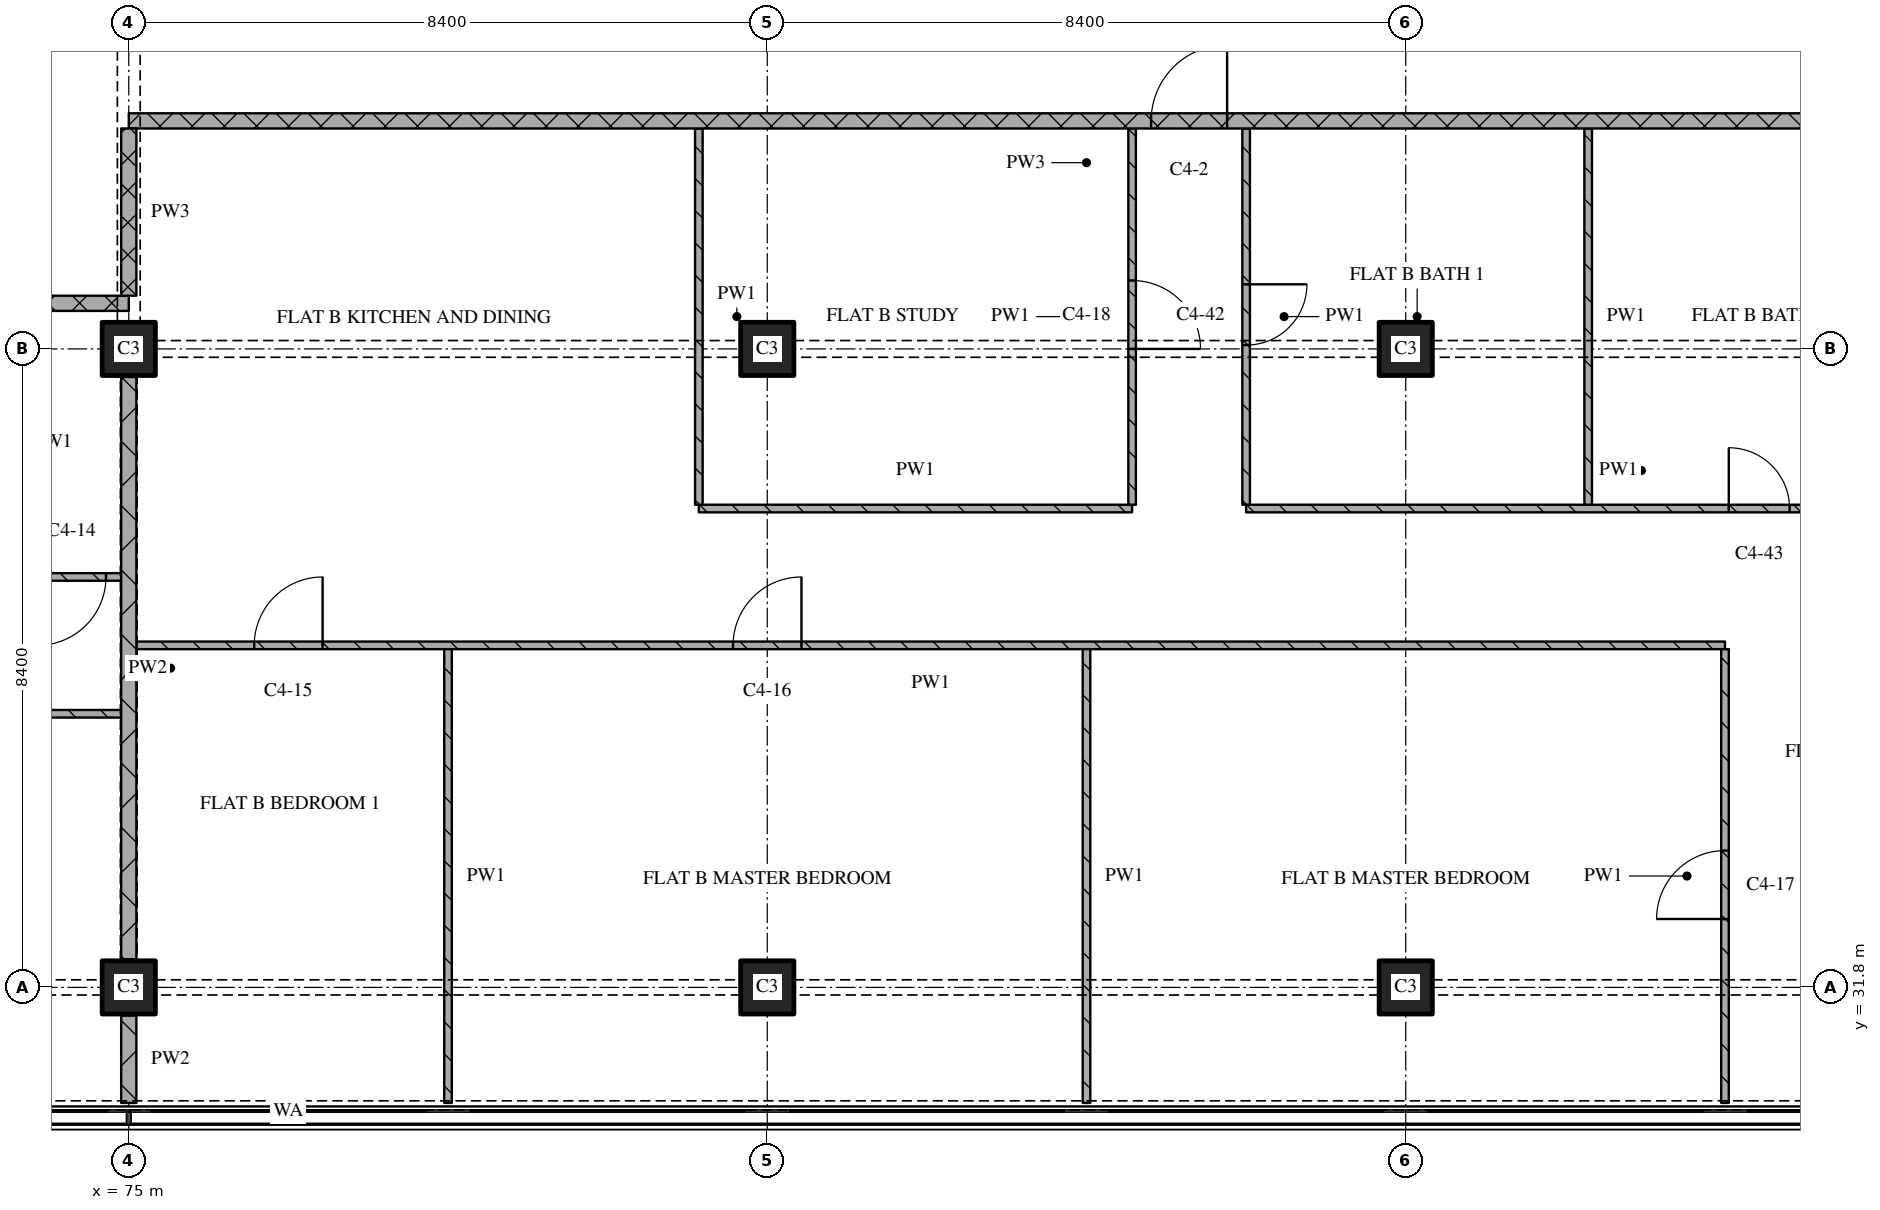
"""IFC4 building model, lengths in metres.
Left out: names, types, materials, properties, quantities, classifications, styles, units other than length and angle.
Written with IfcOpenShell. Run it as: python <this file> out.ifc"""

import sys

from ifc_helpers import new_model, si_unit, direction, frame, frame_2d, origin, origin_2d, place, context, subcontext, project, spatial, rectangle, extrude, element, fill, save


model = new_model("IFC4")
c1 = context("Model", 3, precision=1e-05, world=origin(), true_north=direction((0.0, 1.0)))
c2 = subcontext(c1, "Body", "Model", "MODEL_VIEW")
j1 = project(units=[si_unit("LENGTHUNIT", "METRE"), si_unit("PLANEANGLEUNIT", "RADIAN")], contexts=[c1])
p1 = place(None, origin())
s1 = spatial("IfcSite", under=j1, at=p1, CompositionType="ELEMENT")
p2 = place(p1, origin())
s2 = spatial("IfcBuilding", under=s1, at=p2, CompositionType="ELEMENT")
p3 = place(p2, frame((0.0, 0.0, 183.45)))
s3 = spatial("IfcBuildingStorey", under=s2, at=p3, CompositionType="ELEMENT", Elevation=183.45)
for number, where, z_axis, x_axis in (
    (1, (75.0, 31.8, 0.0), (0.0, 0.0, 1.0), (1.0, 0.0, 0.0)),
    (2, (75.0, 40.2, 0.0), (0.0, 0.0, 1.0), (1.0, 0.0, 0.0)),
    (3, (83.4, 31.8, 0.0), (0.0, 0.0, 1.0), (1.0, 0.0, 0.0)),
    (4, (83.4, 40.2, 0.0), (0.0, 0.0, 1.0), (1.0, 0.0, 0.0)),
    (5, (91.8, 31.8, 0.0), (0.0, 0.0, 1.0), (1.0, 0.0, 0.0)),
    (6, (91.8, 40.2, 0.0), (0.0, 0.0, 1.0), (1.0, 0.0, 0.0)),
):
    element("IfcColumn", number, at=place(p3, frame(where, z_axis=z_axis, x_axis=x_axis)), inside=s3, PredefinedType="COLUMN", context=c2, shape_type="SweptSolid", body=[
        extrude(rectangle(XDim=0.7, YDim=0.7, at=origin_2d()), origin(), (0.0, 0.0, 1.0), 3.6),
    ])
p4 = place(p3, frame((74.9, 35.4, 0.0), z_axis=(0.0, 0.0, 1.0), x_axis=(-1.0, 0.0, 0.0)))
e7 = element("IfcWall", 7, at=p4, inside=s3, PredefinedType="PARTITIONING", context=c2, shape_type="SweptSolid", body=[
    extrude(rectangle(XDim=8.3, YDim=0.1, at=frame_2d((4.15, 0.0))), origin(), (0.0, 0.0, 1.0), 3.32),
])
p5 = place(p4, frame((3.65, 0.0, 0.0)))
e8 = element("IfcOpeningElement", 8, at=p5, cuts=e7, PredefinedType="OPENING", context=c2, shape_type="SweptSolid", body=[
    extrude(rectangle(XDim=0.9, YDim=2.1, at=frame_2d((0.45, 1.05))), frame((0.0, 0.06, 0.0), z_axis=(0.0, -1.0, 0.0), x_axis=(1.0, 0.0, 0.0)), (0.0, 0.0, 1.0), 0.12),
])
p6 = place(p3, frame((96.0, 36.3, 0.0), z_axis=(0.0, 0.0, 1.0), x_axis=(-1.0, 0.0, 0.0)))
e9 = element("IfcWall", 9, at=p6, inside=s3, PredefinedType="PARTITIONING", context=c2, shape_type="SweptSolid", body=[
    extrude(rectangle(XDim=20.9, YDim=0.1, at=frame_2d((10.45, 0.0))), origin(), (0.0, 0.0, 1.0), 3.32),
])
p7 = place(p6, frame((12.15, 0.0, 0.0)))
e10 = element("IfcOpeningElement", 10, at=p7, cuts=e9, PredefinedType="OPENING", context=c2, shape_type="SweptSolid", body=[
    extrude(rectangle(XDim=0.9, YDim=2.1, at=frame_2d((0.45, 1.05))), frame((0.0, 0.06, 0.0), z_axis=(0.0, -1.0, 0.0), x_axis=(1.0, 0.0, 0.0)), (0.0, 0.0, 1.0), 0.12),
])
p8 = place(p6, frame((18.45, 0.0, 0.0)))
e11 = element("IfcOpeningElement", 11, at=p8, cuts=e9, PredefinedType="OPENING", context=c2, shape_type="SweptSolid", body=[
    extrude(rectangle(XDim=0.9, YDim=2.1, at=frame_2d((0.45, 1.05))), frame((0.0, 0.06, 0.0), z_axis=(0.0, -1.0, 0.0), x_axis=(1.0, 0.0, 0.0)), (0.0, 0.0, 1.0), 0.12),
])
p9 = place(p3, frame((64.5, 37.2, 0.0), z_axis=(0.0, 0.0, 1.0), x_axis=(1.0, 0.0, 0.0)))
e12 = element("IfcWall", 12, at=p9, inside=s3, PredefinedType="PARTITIONING", context=c2, shape_type="SweptSolid", body=[
    extrude(rectangle(XDim=10.4, YDim=0.1, at=frame_2d((5.2, 0.0))), origin(), (0.0, 0.0, 1.0), 3.32),
])
p10 = place(p9, frame((6.35, 0.0, 0.0)))
e13 = element("IfcOpeningElement", 13, at=p10, cuts=e12, PredefinedType="OPENING", context=c2, shape_type="SweptSolid", body=[
    extrude(rectangle(XDim=0.8, YDim=2.1, at=frame_2d((0.4, 1.05))), frame((0.0, 0.06, 0.0), z_axis=(0.0, -1.0, 0.0), x_axis=(1.0, 0.0, 0.0)), (0.0, 0.0, 1.0), 0.12),
])
p11 = place(p9, frame((9.3, 0.0, 0.0)))
e14 = element("IfcOpeningElement", 14, at=p11, cuts=e12, PredefinedType="OPENING", context=c2, shape_type="SweptSolid", body=[
    extrude(rectangle(XDim=0.9, YDim=2.1, at=frame_2d((0.45, 1.05))), frame((0.0, 0.06, 0.0), z_axis=(0.0, -1.0, 0.0), x_axis=(1.0, 0.0, 0.0)), (0.0, 0.0, 1.0), 0.12),
])
p12 = place(p3, frame((82.5, 38.1, 0.0), z_axis=(0.0, 0.0, 1.0), x_axis=(1.0, 0.0, 0.0)))
e15 = element("IfcWall", 15, at=p12, inside=s3, PredefinedType="PARTITIONING", context=c2, shape_type="SweptSolid", body=[
    extrude(rectangle(XDim=5.7, YDim=0.1, at=frame_2d((2.85, 0.0))), origin(), (0.0, 0.0, 1.0), 3.32),
])
p13 = place(p3, frame((89.7, 38.1, 0.0), z_axis=(0.0, 0.0, 1.0), x_axis=(1.0, 0.0, 0.0)))
e16 = element("IfcWall", 16, at=p13, inside=s3, PredefinedType="PARTITIONING", context=c2, shape_type="SweptSolid", body=[
    extrude(rectangle(XDim=10.4, YDim=0.1, at=frame_2d((5.2, 0.0))), origin(), (0.0, 0.0, 1.0), 3.32),
])
p14 = place(p13, frame((6.35, 0.0, 0.0)))
e17 = element("IfcOpeningElement", 17, at=p14, cuts=e16, PredefinedType="OPENING", context=c2, shape_type="SweptSolid", body=[
    extrude(rectangle(XDim=0.8, YDim=2.1, at=frame_2d((0.4, 1.05))), frame((0.0, 0.06, 0.0), z_axis=(0.0, -1.0, 0.0), x_axis=(1.0, 0.0, 0.0)), (0.0, 0.0, 1.0), 0.12),
])
p15 = place(p13, frame((9.3, 0.0, 0.0)))
e18 = element("IfcOpeningElement", 18, at=p15, cuts=e16, PredefinedType="OPENING", context=c2, shape_type="SweptSolid", body=[
    extrude(rectangle(XDim=0.9, YDim=2.1, at=frame_2d((0.45, 1.05))), frame((0.0, 0.06, 0.0), z_axis=(0.0, -1.0, 0.0), x_axis=(1.0, 0.0, 0.0)), (0.0, 0.0, 1.0), 0.12),
])
p16 = place(p3, frame((75.0, 40.8, 0.0), z_axis=(0.0, 0.0, 1.0), x_axis=(-1.0, 0.0, 0.0)))
e19 = element("IfcWall", 19, at=p16, inside=s3, PredefinedType="PARTITIONING", context=c2, shape_type="SweptSolid", body=[
    extrude(rectangle(XDim=24.28, YDim=0.2, at=frame_2d((12.14, 0.0))), origin(), (0.0, 0.0, 1.0), 3.32),
])
p17 = place(p16, frame((10.75, 0.0, 0.0)))
e20 = element("IfcOpeningElement", 20, at=p17, cuts=e19, PredefinedType="OPENING", context=c2, shape_type="SweptSolid", body=[
    extrude(rectangle(XDim=1.0, YDim=2.1, at=frame_2d((0.5, 1.05))), frame((0.0, 0.11, 0.0), z_axis=(0.0, -1.0, 0.0), x_axis=(1.0, 0.0, 0.0)), (0.0, 0.0, 1.0), 0.22),
])
p18 = place(p3, frame((100.2, 43.2, 0.0), z_axis=(0.0, 0.0, 1.0), x_axis=(-1.0, 0.0, 0.0)))
e21 = element("IfcWall", 21, at=p18, inside=s3, PredefinedType="PARTITIONING", context=c2, shape_type="SweptSolid", body=[
    extrude(rectangle(XDim=25.2, YDim=0.2, at=frame_2d((12.6, 0.0))), origin(), (0.0, 0.0, 1.0), 3.32),
])
p19 = place(p18, frame((10.75, 0.0, 0.0)))
e22 = element("IfcOpeningElement", 22, at=p19, cuts=e21, PredefinedType="OPENING", context=c2, shape_type="SweptSolid", body=[
    extrude(rectangle(XDim=1.0, YDim=2.1, at=frame_2d((0.5, 1.05))), frame((0.0, 0.11, 0.0), z_axis=(0.0, -1.0, 0.0), x_axis=(1.0, 0.0, 0.0)), (0.0, 0.0, 1.0), 0.22),
])
p20 = place(p3, frame((75.0, 43.1, 0.0), z_axis=(0.0, 0.0, 1.0), x_axis=(0.0, -1.0, 0.0)))
e23 = element("IfcWall", 23, at=p20, inside=s3, PredefinedType="PARTITIONING", context=c2, shape_type="SweptSolid", body=[
    extrude(rectangle(XDim=2.2, YDim=0.2, at=frame_2d((1.1, 0.0))), origin(), (0.0, 0.0, 1.0), 2.43),
])
p21 = place(p3, frame((75.0, 31.43, 0.0), z_axis=(0.0, 0.0, 1.0), x_axis=(0.0, -1.0, 0.0)))
e24 = element("IfcWall", 24, at=p21, inside=s3, PredefinedType="PARTITIONING", context=c2, shape_type="SweptSolid", body=[
    extrude(rectangle(XDim=1.15, YDim=0.2, at=frame_2d((0.575, 0.0))), origin(), (0.0, 0.0, 1.0), 3.32),
])
p22 = place(p3, frame((75.0, 39.83, 0.0), z_axis=(0.0, 0.0, 1.0), x_axis=(0.0, -1.0, 0.0)))
e25 = element("IfcWall", 25, at=p22, inside=s3, PredefinedType="PARTITIONING", context=c2, shape_type="SweptSolid", body=[
    extrude(rectangle(XDim=7.66, YDim=0.2, at=frame_2d((3.83, 0.0))), origin(), (0.0, 0.0, 1.0), 2.72),
])
p23 = place(p3, frame((79.2, 36.25, 0.0), z_axis=(0.0, 0.0, 1.0), x_axis=(0.0, -1.0, 0.0)))
e26 = element("IfcWall", 26, at=p23, inside=s3, PredefinedType="PARTITIONING", context=c2, shape_type="SweptSolid", body=[
    extrude(rectangle(XDim=5.97, YDim=0.1, at=frame_2d((2.985, 0.0))), origin(), (0.0, 0.0, 1.0), 3.32),
])
p24 = place(p3, frame((82.5, 43.1, 0.0), z_axis=(0.0, 0.0, 1.0), x_axis=(0.0, -1.0, 0.0)))
e27 = element("IfcWall", 27, at=p24, inside=s3, PredefinedType="PARTITIONING", context=c2, shape_type="SweptSolid", body=[
    extrude(rectangle(XDim=4.95, YDim=0.1, at=frame_2d((2.475, 0.0))), origin(), (0.0, 0.0, 1.0), 3.32),
])
p25 = place(p3, frame((87.6, 36.25, 0.0), z_axis=(0.0, 0.0, 1.0), x_axis=(0.0, -1.0, 0.0)))
e28 = element("IfcWall", 28, at=p25, inside=s3, PredefinedType="PARTITIONING", context=c2, shape_type="SweptSolid", body=[
    extrude(rectangle(XDim=5.97, YDim=0.1, at=frame_2d((2.985, 0.0))), origin(), (0.0, 0.0, 1.0), 3.32),
])
p26 = place(p3, frame((88.2, 38.15, 0.0), z_axis=(0.0, 0.0, 1.0), x_axis=(0.0, 1.0, 0.0)))
e29 = element("IfcWall", 29, at=p26, inside=s3, PredefinedType="PARTITIONING", context=c2, shape_type="SweptSolid", body=[
    extrude(rectangle(XDim=4.95, YDim=0.1, at=frame_2d((2.475, 0.0))), origin(), (0.0, 0.0, 1.0), 3.32),
])
p27 = place(p26, frame((2.05, 0.0, 0.0)))
e30 = element("IfcOpeningElement", 30, at=p27, cuts=e29, PredefinedType="OPENING", context=c2, shape_type="SweptSolid", body=[
    extrude(rectangle(XDim=0.9, YDim=2.1, at=frame_2d((0.45, 1.05))), frame((0.0, 0.06, 0.0), z_axis=(0.0, -1.0, 0.0), x_axis=(1.0, 0.0, 0.0)), (0.0, 0.0, 1.0), 0.12),
])
p28 = place(p3, frame((89.7, 43.1, 0.0), z_axis=(0.0, 0.0, 1.0), x_axis=(0.0, -1.0, 0.0)))
e31 = element("IfcWall", 31, at=p28, inside=s3, PredefinedType="PARTITIONING", context=c2, shape_type="SweptSolid", body=[
    extrude(rectangle(XDim=4.95, YDim=0.1, at=frame_2d((2.475, 0.0))), origin(), (0.0, 0.0, 1.0), 3.32),
])
p29 = place(p28, frame((2.05, 0.0, 0.0)))
e32 = element("IfcOpeningElement", 32, at=p29, cuts=e31, PredefinedType="OPENING", context=c2, shape_type="SweptSolid", body=[
    extrude(rectangle(XDim=0.8, YDim=2.1, at=frame_2d((0.4, 1.05))), frame((0.0, 0.06, 0.0), z_axis=(0.0, -1.0, 0.0), x_axis=(1.0, 0.0, 0.0)), (0.0, 0.0, 1.0), 0.12),
])
p30 = place(p3, frame((94.2, 43.1, 0.0), z_axis=(0.0, 0.0, 1.0), x_axis=(0.0, -1.0, 0.0)))
e33 = element("IfcWall", 33, at=p30, inside=s3, PredefinedType="PARTITIONING", context=c2, shape_type="SweptSolid", body=[
    extrude(rectangle(XDim=4.95, YDim=0.1, at=frame_2d((2.475, 0.0))), origin(), (0.0, 0.0, 1.0), 3.32),
])
p31 = place(p3, frame((96.0, 30.28, 0.0), z_axis=(0.0, 0.0, 1.0), x_axis=(0.0, 1.0, 0.0)))
e34 = element("IfcWall", 34, at=p31, inside=s3, PredefinedType="PARTITIONING", context=c2, shape_type="SweptSolid", body=[
    extrude(rectangle(XDim=5.97, YDim=0.1, at=frame_2d((2.985, 0.0))), origin(), (0.0, 0.0, 1.0), 3.32),
])
p32 = place(p31, frame((2.42, 0.0, 0.0)))
e35 = element("IfcOpeningElement", 35, at=p32, cuts=e34, PredefinedType="OPENING", context=c2, shape_type="SweptSolid", body=[
    extrude(rectangle(XDim=0.9, YDim=2.1, at=frame_2d((0.45, 1.05))), frame((0.0, 0.06, 0.0), z_axis=(0.0, -1.0, 0.0), x_axis=(1.0, 0.0, 0.0)), (0.0, 0.0, 1.0), 0.12),
])
p33 = place(p7, origin())
e36 = element("IfcDoor", 36, at=p33, inside=s3, OperationType="SINGLE_SWING_RIGHT", PredefinedType="DOOR", context=c2, shape_type="SweptSolid", body=[
    extrude(rectangle(XDim=0.9, YDim=2.1, at=frame_2d((0.45, 1.05))), frame((0.0, 0.025, 0.0), z_axis=(0.0, -1.0, 0.0), x_axis=(1.0, 0.0, 0.0)), (0.0, 0.0, 1.0), 0.05),
])
fill(e10, e36)
p34 = place(p8, origin())
e37 = element("IfcDoor", 37, at=p34, inside=s3, OperationType="SINGLE_SWING_RIGHT", PredefinedType="DOOR", context=c2, shape_type="SweptSolid", body=[
    extrude(rectangle(XDim=0.9, YDim=2.1, at=frame_2d((0.45, 1.05))), frame((0.0, 0.025, 0.0), z_axis=(0.0, -1.0, 0.0), x_axis=(1.0, 0.0, 0.0)), (0.0, 0.0, 1.0), 0.05),
])
fill(e11, e37)
p35 = place(p11, origin())
e38 = element("IfcDoor", 38, at=p35, inside=s3, OperationType="SINGLE_SWING_RIGHT", PredefinedType="DOOR", context=c2, shape_type="SweptSolid", body=[
    extrude(rectangle(XDim=0.9, YDim=2.1, at=frame_2d((0.45, 1.05))), frame((0.0, 0.025, 0.0), z_axis=(0.0, -1.0, 0.0), x_axis=(1.0, 0.0, 0.0)), (0.0, 0.0, 1.0), 0.05),
])
fill(e14, e38)
p36 = place(p14, origin())
e39 = element("IfcDoor", 39, at=p36, inside=s3, OperationType="SINGLE_SWING_LEFT", PredefinedType="DOOR", context=c2, shape_type="SweptSolid", body=[
    extrude(rectangle(XDim=0.8, YDim=2.1, at=frame_2d((0.4, 1.05))), frame((0.0, 0.025, 0.0), z_axis=(0.0, -1.0, 0.0), x_axis=(1.0, 0.0, 0.0)), (0.0, 0.0, 1.0), 0.05),
])
fill(e17, e39)
p37 = place(p19, origin())
e40 = element("IfcDoor", 40, at=p37, inside=s3, OperationType="SINGLE_SWING_RIGHT", PredefinedType="DOOR", context=c2, shape_type="SweptSolid", body=[
    extrude(rectangle(XDim=1.0, YDim=2.1, at=frame_2d((0.5, 1.05))), frame((0.0, 0.025, 0.0), z_axis=(0.0, -1.0, 0.0), x_axis=(1.0, 0.0, 0.0)), (0.0, 0.0, 1.0), 0.05),
])
fill(e22, e40)
p38 = place(p27, origin())
e41 = element("IfcDoor", 41, at=p38, inside=s3, OperationType="SINGLE_SWING_RIGHT", PredefinedType="DOOR", context=c2, shape_type="SweptSolid", body=[
    extrude(rectangle(XDim=0.9, YDim=2.1, at=frame_2d((0.45, 1.05))), frame((0.0, 0.025, 0.0), z_axis=(0.0, -1.0, 0.0), x_axis=(1.0, 0.0, 0.0)), (0.0, 0.0, 1.0), 0.05),
])
fill(e30, e41)
p39 = place(p29, origin())
e42 = element("IfcDoor", 42, at=p39, inside=s3, OperationType="SINGLE_SWING_LEFT", PredefinedType="DOOR", context=c2, shape_type="SweptSolid", body=[
    extrude(rectangle(XDim=0.8, YDim=2.1, at=frame_2d((0.4, 1.05))), frame((0.0, 0.025, 0.0), z_axis=(0.0, -1.0, 0.0), x_axis=(1.0, 0.0, 0.0)), (0.0, 0.0, 1.0), 0.05),
])
fill(e32, e42)
p40 = place(p32, origin())
e43 = element("IfcDoor", 43, at=p40, inside=s3, OperationType="SINGLE_SWING_LEFT", PredefinedType="DOOR", context=c2, shape_type="SweptSolid", body=[
    extrude(rectangle(XDim=0.9, YDim=2.1, at=frame_2d((0.45, 1.05))), frame((0.0, 0.025, 0.0), z_axis=(0.0, -1.0, 0.0), x_axis=(1.0, 0.0, 0.0)), (0.0, 0.0, 1.0), 0.05),
])
fill(e35, e43)
save(model, sys.argv[1])
